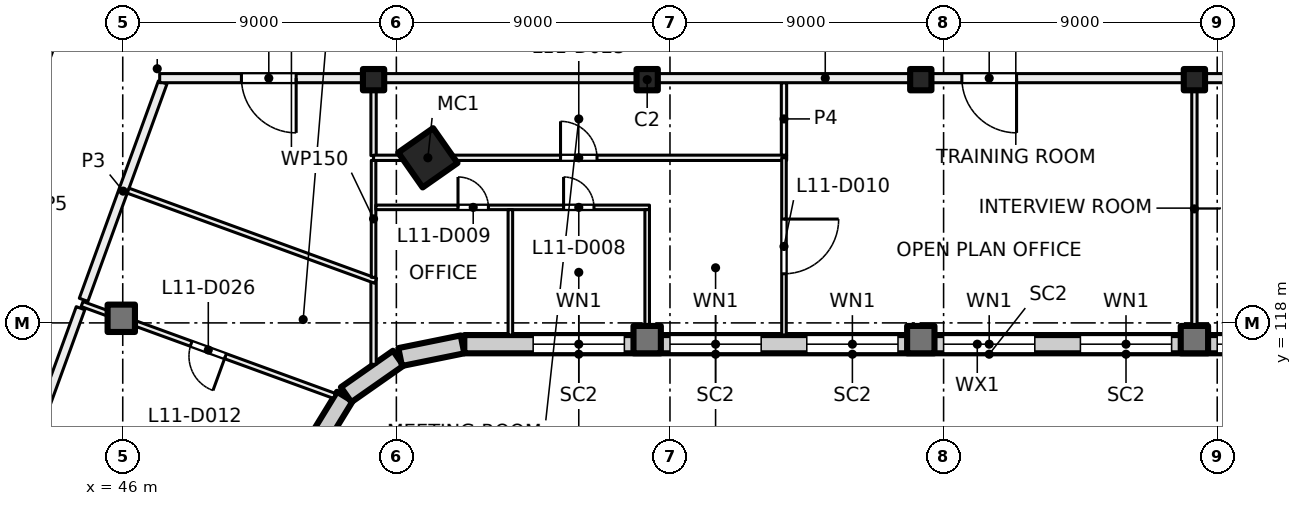
"""IFC4 building model, lengths in metres.
Left out: names, types, materials, properties, quantities, classifications, styles, units other than length and angle.
Written with IfcOpenShell. Run it as: python <this file> out.ifc"""

import sys

from ifc_helpers import new_model, si_unit, direction, frame, frame_2d, origin, origin_2d, place, context, subcontext, project, spatial, rectangle, hollow_rectangle, extrude, element, fill, save


model = new_model("IFC4")
c1 = context("Model", 3, precision=1e-05, world=origin(), true_north=direction((0.0, 1.0)))
c2 = subcontext(c1, "Body", "Model", "MODEL_VIEW")
j1 = project(units=[si_unit("LENGTHUNIT", "METRE"), si_unit("PLANEANGLEUNIT", "RADIAN")], contexts=[c1])
p1 = place(None, origin())
s1 = spatial("IfcSite", under=j1, at=p1, CompositionType="ELEMENT")
p2 = place(p1, origin())
s2 = spatial("IfcBuilding", under=s1, at=p2, CompositionType="ELEMENT")
p3 = place(p2, frame((0.0, 0.0, 51.5)))
s3 = spatial("IfcBuildingStorey", under=s2, at=p3, CompositionType="ELEMENT", Elevation=51.5)
p4 = place(p3, frame((56.036, 123.43, 0.0), z_axis=(0.0, 0.0, 1.0), x_axis=(0.573576436351, -0.819152044289, 0.0)))
e1 = element("IfcColumn", 1, at=p4, inside=s3, PredefinedType="COLUMN", context=c2, shape_type="SweptSolid", body=[
    extrude(hollow_rectangle(XDim=1.4, YDim=1.4, WallThickness=0.04, at=origin_2d()), origin(), (0.0, 0.0, 1.0), 4.0),
])
for number, where, z_axis, x_axis in (
    (2, (54.25, 126.0, 0.0), (0.0, 0.0, 1.0), (1.0, 0.0, 0.0)),
    (3, (63.25, 126.0, 0.0), (0.0, 0.0, 1.0), (1.0, 0.0, 0.0)),
    (4, (72.25, 126.0, 0.0), (0.0, 0.0, 1.0), (1.0, 0.0, 0.0)),
    (5, (81.25, 126.0, 0.0), (0.0, 0.0, 1.0), (1.0, 0.0, 0.0)),
):
    element("IfcColumn", number, at=place(p3, frame(where, z_axis=z_axis, x_axis=x_axis)), inside=s3, PredefinedType="COLUMN", context=c2, shape_type="SweptSolid", body=[
        extrude(rectangle(XDim=0.7, YDim=0.7, at=origin_2d()), origin(), (0.0, 0.0, 1.0), 4.0),
    ])
for number, where, z_axis, x_axis in (
    (6, (45.952, 118.152, 0.0), (0.0, 0.0, 1.0), (1.0, 0.0, 0.0)),
    (7, (63.25, 117.45, 0.0), (0.0, 0.0, 1.0), (1.0, 0.0, 0.0)),
    (8, (72.25, 117.45, 0.0), (0.0, 0.0, 1.0), (1.0, 0.0, 0.0)),
    (9, (81.25, 117.45, 0.0), (0.0, 0.0, 1.0), (1.0, 0.0, 0.0)),
):
    element("IfcColumn", number, at=place(p3, frame(where, z_axis=z_axis, x_axis=x_axis)), inside=s3, PredefinedType="COLUMN", context=c2, shape_type="SweptSolid", body=[
        extrude(rectangle(XDim=0.9, YDim=0.9, at=origin_2d()), origin(), (0.0, 0.0, 1.0), 4.0),
    ])
p5 = place(p3, frame((53.305, 115.578, 0.0), z_axis=(0.0, 0.0, 1.0), x_axis=(-0.522402266438, -0.852699168535, 0.0)))
e10 = element("IfcWall", 10, at=p5, inside=s3, PredefinedType="SOLIDWALL", context=c2, shape_type="SweptSolid", body=[
    extrude(rectangle(XDim=2.042, YDim=0.6, at=frame_2d((1.021, 0.0))), origin(), (0.0, 0.0, 1.0), 3.625),
])
for number, where, z_axis, x_axis in (
    (11, (55.062, 116.839, 0.0), (0.0, 0.0, 1.0), (-0.819, -0.574, 0.0)),
    (12, (57.175, 117.294, 0.0), (0.0, 0.0, 1.0), (-0.98, -0.199, 0.0)),
):
    element("IfcWall", number, at=place(p3, frame(where, z_axis=z_axis, x_axis=x_axis)), inside=s3, PredefinedType="SOLIDWALL", context=c2, shape_type="SweptSolid", body=[
        extrude(rectangle(XDim=2.092, YDim=0.6, at=frame_2d((1.046, 0.0))), origin(), (0.0, 0.0, 1.0), 3.625),
    ])
p6 = place(p3, frame((90.98, 117.3, 0.0), z_axis=(0.0, 0.0, 1.0), x_axis=(-1.0, 0.0, 0.0)))
e13 = element("IfcWall", 13, at=p6, inside=s3, PredefinedType="SOLIDWALL", context=c2, shape_type="SweptSolid", body=[
    extrude(rectangle(XDim=33.745, YDim=0.6, at=frame_2d((16.873, 0.0))), origin(), (0.0, 0.0, 1.0), 3.625),
])
p7 = place(p6, frame((1.48, 0.0, 0.9)))
e14 = element("IfcOpeningElement", 14, at=p7, cuts=e13, PredefinedType="OPENING", context=c2, shape_type="SweptSolid", body=[
    extrude(rectangle(XDim=3.0, YDim=2.4, at=frame_2d((1.5, 1.2))), frame((0.0, 0.31, 0.0), z_axis=(0.0, -1.0, 0.0), x_axis=(1.0, 0.0, 0.0)), (0.0, 0.0, 1.0), 0.62),
])
p8 = place(p6, frame((5.98, 0.0, 0.9)))
e15 = element("IfcOpeningElement", 15, at=p8, cuts=e13, PredefinedType="OPENING", context=c2, shape_type="SweptSolid", body=[
    extrude(rectangle(XDim=3.0, YDim=2.4, at=frame_2d((1.5, 1.2))), frame((0.0, 0.31, 0.0), z_axis=(0.0, -1.0, 0.0), x_axis=(1.0, 0.0, 0.0)), (0.0, 0.0, 1.0), 0.62),
])
p9 = place(p6, frame((10.48, 0.0, 0.9)))
e16 = element("IfcOpeningElement", 16, at=p9, cuts=e13, PredefinedType="OPENING", context=c2, shape_type="SweptSolid", body=[
    extrude(rectangle(XDim=3.0, YDim=2.4, at=frame_2d((1.5, 1.2))), frame((0.0, 0.31, 0.0), z_axis=(0.0, -1.0, 0.0), x_axis=(1.0, 0.0, 0.0)), (0.0, 0.0, 1.0), 0.62),
])
p10 = place(p6, frame((14.98, 0.0, 0.9)))
e17 = element("IfcOpeningElement", 17, at=p10, cuts=e13, PredefinedType="OPENING", context=c2, shape_type="SweptSolid", body=[
    extrude(rectangle(XDim=3.0, YDim=2.4, at=frame_2d((1.5, 1.2))), frame((0.0, 0.31, 0.0), z_axis=(0.0, -1.0, 0.0), x_axis=(1.0, 0.0, 0.0)), (0.0, 0.0, 1.0), 0.62),
])
p11 = place(p6, frame((19.48, 0.0, 0.9)))
e18 = element("IfcOpeningElement", 18, at=p11, cuts=e13, PredefinedType="OPENING", context=c2, shape_type="SweptSolid", body=[
    extrude(rectangle(XDim=3.0, YDim=2.4, at=frame_2d((1.5, 1.2))), frame((0.0, 0.31, 0.0), z_axis=(0.0, -1.0, 0.0), x_axis=(1.0, 0.0, 0.0)), (0.0, 0.0, 1.0), 0.62),
])
p12 = place(p6, frame((23.98, 0.0, 0.9)))
e19 = element("IfcOpeningElement", 19, at=p12, cuts=e13, PredefinedType="OPENING", context=c2, shape_type="SweptSolid", body=[
    extrude(rectangle(XDim=3.0, YDim=2.4, at=frame_2d((1.5, 1.2))), frame((0.0, 0.31, 0.0), z_axis=(0.0, -1.0, 0.0), x_axis=(1.0, 0.0, 0.0)), (0.0, 0.0, 1.0), 0.62),
])
p13 = place(p6, frame((28.48, 0.0, 0.9)))
e20 = element("IfcOpeningElement", 20, at=p13, cuts=e13, PredefinedType="OPENING", context=c2, shape_type="SweptSolid", body=[
    extrude(rectangle(XDim=3.0, YDim=2.4, at=frame_2d((1.5, 1.2))), frame((0.0, 0.31, 0.0), z_axis=(0.0, -1.0, 0.0), x_axis=(1.0, 0.0, 0.0)), (0.0, 0.0, 1.0), 0.62),
])
p14 = place(p3, frame((32.881, 97.657, 0.0), z_axis=(0.0, 0.0, 1.0), x_axis=(0.342017360004, 0.939693633828, 0.0)))
e21 = element("IfcWall", 21, at=p14, inside=s3, PredefinedType="PARTITIONING", context=c2, shape_type="SweptSolid", body=[
    extrude(rectangle(XDim=34.516, YDim=0.3, at=frame_2d((17.258, 0.0))), origin(), (0.0, 0.0, 1.0), 3.625),
])
p15 = place(p14, frame((4.275, 0.0, 0.0)))
e22 = element("IfcOpeningElement", 22, at=p15, cuts=e21, PredefinedType="OPENING", context=c2, shape_type="SweptSolid", body=[
    extrude(rectangle(XDim=1.2, YDim=2.1, at=frame_2d((0.6, 1.05))), frame((0.0, 0.16, 0.0), z_axis=(0.0, -1.0, 0.0), x_axis=(1.0, 0.0, 0.0)), (0.0, 0.0, 1.0), 0.32),
])
p16 = place(p14, frame((16.0, 0.0, 0.0)))
e23 = element("IfcOpeningElement", 23, at=p16, cuts=e21, PredefinedType="OPENING", context=c2, shape_type="SweptSolid", body=[
    extrude(rectangle(XDim=1.0, YDim=2.1, at=frame_2d((0.5, 1.05))), frame((0.0, 0.16, 0.0), z_axis=(0.0, -1.0, 0.0), x_axis=(1.0, 0.0, 0.0)), (0.0, 0.0, 1.0), 0.32),
])
p17 = place(p14, frame((21.5, 0.0, 0.0)))
e24 = element("IfcOpeningElement", 24, at=p17, cuts=e21, PredefinedType="OPENING", context=c2, shape_type="SweptSolid", body=[
    extrude(rectangle(XDim=1.0, YDim=2.1, at=frame_2d((0.5, 1.05))), frame((0.0, 0.16, 0.0), z_axis=(0.0, -1.0, 0.0), x_axis=(1.0, 0.0, 0.0)), (0.0, 0.0, 1.0), 0.32),
])
p18 = place(p3, frame((52.965, 115.598, 0.0), z_axis=(0.0, 0.0, 1.0), x_axis=(-0.939650555598, 0.342135694374, 0.0)))
e25 = element("IfcWall", 25, at=p18, inside=s3, PredefinedType="PARTITIONING", context=c2, shape_type="SweptSolid", body=[
    extrude(rectangle(XDim=8.836, YDim=0.175, at=frame_2d((4.418, 0.0))), origin(), (0.0, 0.0, 1.0), 3.625),
])
p19 = place(p18, frame((3.818, 0.0, 0.0)))
e26 = element("IfcOpeningElement", 26, at=p19, cuts=e25, PredefinedType="OPENING", context=c2, shape_type="SweptSolid", body=[
    extrude(rectangle(XDim=1.2, YDim=2.1, at=frame_2d((0.6, 1.05))), frame((0.0, 0.097, 0.0), z_axis=(0.0, -1.0, 0.0), x_axis=(1.0, 0.0, 0.0)), (0.0, 0.0, 1.0), 0.195),
])
p20 = place(p3, frame((44.612, 118.483, 0.0), z_axis=(0.0, 0.0, 1.0), x_axis=(-0.342043123066, -0.939684256526, 0.0)))
e27 = element("IfcWall", 27, at=p20, inside=s3, PredefinedType="PARTITIONING", context=c2, shape_type="SweptSolid", body=[
    extrude(rectangle(XDim=23.582, YDim=0.3, at=frame_2d((11.791, 0.0))), origin(), (0.0, 0.0, 1.0), 3.625),
])
p21 = place(p20, frame((14.932, 0.0, 0.0)))
e28 = element("IfcOpeningElement", 28, at=p21, cuts=e27, PredefinedType="OPENING", context=c2, shape_type="SweptSolid", body=[
    extrude(rectangle(XDim=0.8, YDim=2.1, at=frame_2d((0.4, 1.05))), frame((0.0, 0.16, 0.0), z_axis=(0.0, -1.0, 0.0), x_axis=(1.0, 0.0, 0.0)), (0.0, 0.0, 1.0), 0.32),
])
p22 = place(p20, frame((10.982, 0.0, 0.0)))
e29 = element("IfcOpeningElement", 29, at=p22, cuts=e27, PredefinedType="OPENING", context=c2, shape_type="SweptSolid", body=[
    extrude(rectangle(XDim=1.2, YDim=2.1, at=frame_2d((0.6, 1.05))), frame((0.0, 0.16, 0.0), z_axis=(0.0, -1.0, 0.0), x_axis=(1.0, 0.0, 0.0)), (0.0, 0.0, 1.0), 0.32),
])
p23 = place(p20, frame((19.307, 0.0, 0.0)))
e30 = element("IfcOpeningElement", 30, at=p23, cuts=e27, PredefinedType="OPENING", context=c2, shape_type="SweptSolid", body=[
    extrude(rectangle(XDim=1.8, YDim=2.1, at=frame_2d((0.9, 1.05))), frame((0.0, 0.16, 0.0), z_axis=(0.0, -1.0, 0.0), x_axis=(1.0, 0.0, 0.0)), (0.0, 0.0, 1.0), 0.32),
])
p24 = place(p20, frame((5.756, 0.0, 0.0)))
e31 = element("IfcOpeningElement", 31, at=p24, cuts=e27, PredefinedType="OPENING", context=c2, shape_type="SweptSolid", body=[
    extrude(rectangle(XDim=1.8, YDim=2.1, at=frame_2d((0.9, 1.05))), frame((0.0, 0.16, 0.0), z_axis=(0.0, -1.0, 0.0), x_axis=(1.0, 0.0, 0.0)), (0.0, 0.0, 1.0), 0.32),
])
p25 = place(p3, frame((47.314, 125.909, 0.0), z_axis=(0.0, 0.0, 1.0), x_axis=(-0.34198522802, -0.939705328183, 0.0)))
e32 = element("IfcWall", 32, at=p25, inside=s3, PredefinedType="PARTITIONING", context=c2, shape_type="SweptSolid", body=[
    extrude(rectangle(XDim=7.609, YDim=0.3, at=frame_2d((3.804, 0.0))), origin(), (0.0, 0.0, 1.0), 3.625),
])
p26 = place(p3, frame((54.25, 116.637, 0.0), z_axis=(0.0, 0.0, 1.0), x_axis=(0.0, 1.0, 0.0)))
e33 = element("IfcWall", 33, at=p26, inside=s3, PredefinedType="PARTITIONING", context=c2, shape_type="SweptSolid", body=[
    extrude(rectangle(XDim=2.776, YDim=0.175, at=frame_2d((1.388, 0.0))), origin(), (0.0, 0.0, 1.0), 3.625),
])
p27 = place(p3, frame((54.32, 119.384, 0.0), z_axis=(0.0, 0.0, 1.0), x_axis=(-0.939632908118, 0.342184157994, 0.0)))
e34 = element("IfcWall", 34, at=p27, inside=s3, PredefinedType="PARTITIONING", context=c2, shape_type="SweptSolid", body=[
    extrude(rectangle(XDim=8.665, YDim=0.175, at=frame_2d((4.333, 0.0))), origin(), (0.0, 0.0, 1.0), 3.625),
])
p28 = place(p3, frame((54.25, 119.498, 0.0), z_axis=(0.0, 0.0, 1.0), x_axis=(0.0, 1.0, 0.0)))
e35 = element("IfcWall", 35, at=p28, inside=s3, PredefinedType="PARTITIONING", context=c2, shape_type="SweptSolid", body=[
    extrude(rectangle(XDim=3.848, YDim=0.15, at=frame_2d((1.924, 0.0))), origin(), (0.0, 0.0, 1.0), 3.625),
])
p29 = place(p3, frame((54.325, 121.8, 0.0), z_axis=(0.0, 0.0, 1.0), x_axis=(1.0, 0.0, 0.0)))
e36 = element("IfcWall", 36, at=p29, inside=s3, PredefinedType="PARTITIONING", context=c2, shape_type="SweptSolid", body=[
    extrude(rectangle(XDim=9.0, YDim=0.15, at=frame_2d((4.5, 0.0))), origin(), (0.0, 0.0, 1.0), 3.625),
])
p30 = place(p29, frame((6.175, 0.0, 0.0)))
e37 = element("IfcOpeningElement", 37, at=p30, cuts=e36, PredefinedType="OPENING", context=c2, shape_type="SweptSolid", body=[
    extrude(rectangle(XDim=1.0, YDim=2.1, at=frame_2d((0.5, 1.05))), frame((0.0, 0.085, 0.0), z_axis=(0.0, -1.0, 0.0), x_axis=(1.0, 0.0, 0.0)), (0.0, 0.0, 1.0), 0.17),
])
p31 = place(p29, frame((2.702, 0.0, 0.0)))
e38 = element("IfcOpeningElement", 38, at=p31, cuts=e36, PredefinedType="OPENING", context=c2, shape_type="SweptSolid", body=[
    extrude(rectangle(XDim=1.0, YDim=2.1, at=frame_2d((0.5, 1.05))), frame((0.0, 0.085, 0.0), z_axis=(0.0, -1.0, 0.0), x_axis=(1.0, 0.0, 0.0)), (0.0, 0.0, 1.0), 0.17),
])
p32 = place(p3, frame((54.25, 123.502, 0.0), z_axis=(0.0, 0.0, 1.0), x_axis=(0.0, 1.0, 0.0)))
e39 = element("IfcWall", 39, at=p32, inside=s3, PredefinedType="PARTITIONING", context=c2, shape_type="SweptSolid", body=[
    extrude(rectangle(XDim=2.398, YDim=0.175, at=frame_2d((1.199, 0.0))), origin(), (0.0, 0.0, 1.0), 3.625),
])
p33 = place(p3, frame((54.25, 123.43, 0.0), z_axis=(0.0, 0.0, 1.0), x_axis=(1.0, 0.0, 0.0)))
e40 = element("IfcWall", 40, at=p33, inside=s3, PredefinedType="PARTITIONING", context=c2, shape_type="SweptSolid", body=[
    extrude(rectangle(XDim=13.588, YDim=0.175, at=frame_2d((6.794, 0.0))), origin(), (0.0, 0.0, 1.0), 3.625),
])
p34 = place(p33, frame((6.15, 0.0, 0.0)))
e41 = element("IfcOpeningElement", 41, at=p34, cuts=e40, PredefinedType="OPENING", context=c2, shape_type="SweptSolid", body=[
    extrude(rectangle(XDim=1.2, YDim=2.1, at=frame_2d((0.6, 1.05))), frame((0.0, 0.097, 0.0), z_axis=(0.0, -1.0, 0.0), x_axis=(1.0, 0.0, 0.0)), (0.0, 0.0, 1.0), 0.195),
])
for number, where, z_axis, x_axis in (
    (42, (58.75, 117.6, 0.0), (0.0, 0.0, 1.0), (0.0, 1.0, 0.0)),
    (43, (63.25, 117.6, 0.0), (0.0, 0.0, 1.0), (0.0, 1.0, 0.0)),
):
    element("IfcWall", number, at=place(p3, frame(where, z_axis=z_axis, x_axis=x_axis)), inside=s3, PredefinedType="PARTITIONING", context=c2, shape_type="SweptSolid", body=[
        extrude(rectangle(XDim=4.125, YDim=0.15, at=frame_2d((2.062, 0.0))), origin(), (0.0, 0.0, 1.0), 3.625),
    ])
p35 = place(p3, frame((67.75, 123.433, 0.0), z_axis=(0.0, 0.0, 1.0), x_axis=(0.0, -1.0, 0.0)))
e44 = element("IfcWall", 44, at=p35, inside=s3, PredefinedType="PARTITIONING", context=c2, shape_type="SweptSolid", body=[
    extrude(rectangle(XDim=5.833, YDim=0.15, at=frame_2d((2.917, 0.0))), origin(), (0.0, 0.0, 1.0), 3.625),
])
p36 = place(p35, frame((2.018, 0.0, 0.0)))
e45 = element("IfcOpeningElement", 45, at=p36, cuts=e44, PredefinedType="OPENING", context=c2, shape_type="SweptSolid", body=[
    extrude(rectangle(XDim=1.8, YDim=2.1, at=frame_2d((0.9, 1.05))), frame((0.0, 0.085, 0.0), z_axis=(0.0, -1.0, 0.0), x_axis=(1.0, 0.0, 0.0)), (0.0, 0.0, 1.0), 0.17),
])
p37 = place(p3, frame((67.75, 123.518, 0.0), z_axis=(0.0, 0.0, 1.0), x_axis=(0.0, 1.0, 0.0)))
e46 = element("IfcWall", 46, at=p37, inside=s3, PredefinedType="PARTITIONING", context=c2, shape_type="SweptSolid", body=[
    extrude(rectangle(XDim=2.382, YDim=0.175, at=frame_2d((1.191, 0.0))), origin(), (0.0, 0.0, 1.0), 3.625),
])
p38 = place(p3, frame((81.25, 117.6, 0.0), z_axis=(0.0, 0.0, 1.0), x_axis=(0.0, 1.0, 0.0)))
e47 = element("IfcWall", 47, at=p38, inside=s3, PredefinedType="PARTITIONING", context=c2, shape_type="SweptSolid", body=[
    extrude(rectangle(XDim=8.3, YDim=0.175, at=frame_2d((4.15, 0.0))), origin(), (0.0, 0.0, 1.0), 3.625),
])
p39 = place(p3, frame((91.0, 126.05, 0.0), z_axis=(0.0, 0.0, 1.0), x_axis=(-1.0, 0.0, 0.0)))
e48 = element("IfcWall", 48, at=p39, inside=s3, PredefinedType="PARTITIONING", context=c2, shape_type="SweptSolid", body=[
    extrude(rectangle(XDim=43.785, YDim=0.3, at=frame_2d((21.893, 0.0))), origin(), (0.0, 0.0, 1.0), 3.625),
])
p40 = place(p39, frame((2.025, 0.0, 0.0)))
e49 = element("IfcOpeningElement", 49, at=p40, cuts=e48, PredefinedType="OPENING", context=c2, shape_type="SweptSolid", body=[
    extrude(rectangle(XDim=1.2, YDim=2.1, at=frame_2d((0.6, 1.05))), frame((0.0, 0.16, 0.0), z_axis=(0.0, -1.0, 0.0), x_axis=(1.0, 0.0, 0.0)), (0.0, 0.0, 1.0), 0.32),
])
p41 = place(p39, frame((6.9, 0.0, 0.0)))
e50 = element("IfcOpeningElement", 50, at=p41, cuts=e48, PredefinedType="OPENING", context=c2, shape_type="SweptSolid", body=[
    extrude(rectangle(XDim=1.2, YDim=2.1, at=frame_2d((0.6, 1.05))), frame((0.0, 0.16, 0.0), z_axis=(0.0, -1.0, 0.0), x_axis=(1.0, 0.0, 0.0)), (0.0, 0.0, 1.0), 0.32),
])
p42 = place(p39, frame((15.6, 0.0, 0.0)))
e51 = element("IfcOpeningElement", 51, at=p42, cuts=e48, PredefinedType="OPENING", context=c2, shape_type="SweptSolid", body=[
    extrude(rectangle(XDim=1.8, YDim=2.1, at=frame_2d((0.9, 1.05))), frame((0.0, 0.16, 0.0), z_axis=(0.0, -1.0, 0.0), x_axis=(1.0, 0.0, 0.0)), (0.0, 0.0, 1.0), 0.32),
])
p43 = place(p39, frame((39.296, 0.0, 0.0)))
e52 = element("IfcOpeningElement", 52, at=p43, cuts=e48, PredefinedType="OPENING", context=c2, shape_type="SweptSolid", body=[
    extrude(rectangle(XDim=1.8, YDim=2.1, at=frame_2d((0.9, 1.05))), frame((0.0, 0.16, 0.0), z_axis=(0.0, -1.0, 0.0), x_axis=(1.0, 0.0, 0.0)), (0.0, 0.0, 1.0), 0.32),
])
p44 = place(p8, origin())
e53 = element("IfcWindow", 53, at=p44, inside=s3, PartitioningType="SINGLE_PANEL", PredefinedType="WINDOW", context=c2, shape_type="SweptSolid", body=[
    extrude(rectangle(XDim=3.0, YDim=2.4, at=frame_2d((1.5, 1.2))), frame((0.0, 0.03, 0.0), z_axis=(0.0, -1.0, 0.0), x_axis=(1.0, 0.0, 0.0)), (0.0, 0.0, 1.0), 0.06),
])
fill(e15, e53)
p45 = place(p9, origin())
e54 = element("IfcWindow", 54, at=p45, inside=s3, PartitioningType="SINGLE_PANEL", PredefinedType="WINDOW", context=c2, shape_type="SweptSolid", body=[
    extrude(rectangle(XDim=3.0, YDim=2.4, at=frame_2d((1.5, 1.2))), frame((0.0, 0.03, 0.0), z_axis=(0.0, -1.0, 0.0), x_axis=(1.0, 0.0, 0.0)), (0.0, 0.0, 1.0), 0.06),
])
fill(e16, e54)
p46 = place(p10, origin())
e55 = element("IfcWindow", 55, at=p46, inside=s3, PartitioningType="SINGLE_PANEL", PredefinedType="WINDOW", context=c2, shape_type="SweptSolid", body=[
    extrude(rectangle(XDim=3.0, YDim=2.4, at=frame_2d((1.5, 1.2))), frame((0.0, 0.03, 0.0), z_axis=(0.0, -1.0, 0.0), x_axis=(1.0, 0.0, 0.0)), (0.0, 0.0, 1.0), 0.06),
])
fill(e17, e55)
p47 = place(p11, origin())
e56 = element("IfcWindow", 56, at=p47, inside=s3, PartitioningType="SINGLE_PANEL", PredefinedType="WINDOW", context=c2, shape_type="SweptSolid", body=[
    extrude(rectangle(XDim=3.0, YDim=2.4, at=frame_2d((1.5, 1.2))), frame((0.0, 0.03, 0.0), z_axis=(0.0, -1.0, 0.0), x_axis=(1.0, 0.0, 0.0)), (0.0, 0.0, 1.0), 0.06),
])
fill(e18, e56)
p48 = place(p12, origin())
e57 = element("IfcWindow", 57, at=p48, inside=s3, PartitioningType="SINGLE_PANEL", PredefinedType="WINDOW", context=c2, shape_type="SweptSolid", body=[
    extrude(rectangle(XDim=3.0, YDim=2.4, at=frame_2d((1.5, 1.2))), frame((0.0, 0.03, 0.0), z_axis=(0.0, -1.0, 0.0), x_axis=(1.0, 0.0, 0.0)), (0.0, 0.0, 1.0), 0.06),
])
fill(e19, e57)
p49 = place(p13, origin())
e58 = element("IfcWindow", 58, at=p49, inside=s3, PartitioningType="SINGLE_PANEL", PredefinedType="WINDOW", context=c2, shape_type="SweptSolid", body=[
    extrude(rectangle(XDim=3.0, YDim=2.4, at=frame_2d((1.5, 1.2))), frame((0.0, 0.03, 0.0), z_axis=(0.0, -1.0, 0.0), x_axis=(1.0, 0.0, 0.0)), (0.0, 0.0, 1.0), 0.06),
])
fill(e20, e58)
p50 = place(p42, origin())
e59 = element("IfcDoor", 59, at=p50, inside=s3, OperationType="DOUBLE_DOOR_SINGLE_SWING", PredefinedType="DOOR", context=c2, shape_type="SweptSolid", body=[
    extrude(rectangle(XDim=1.8, YDim=2.1, at=frame_2d((0.9, 1.05))), frame((0.0, 0.025, 0.0), z_axis=(0.0, -1.0, 0.0), x_axis=(1.0, 0.0, 0.0)), (0.0, 0.0, 1.0), 0.05),
])
fill(e51, e59)
p51 = place(p30, origin())
e60 = element("IfcDoor", 60, at=p51, inside=s3, OperationType="SINGLE_SWING_RIGHT", PredefinedType="DOOR", context=c2, shape_type="SweptSolid", body=[
    extrude(rectangle(XDim=1.0, YDim=2.1, at=frame_2d((0.5, 1.05))), frame((0.0, 0.025, 0.0), z_axis=(0.0, -1.0, 0.0), x_axis=(1.0, 0.0, 0.0)), (0.0, 0.0, 1.0), 0.05),
])
fill(e37, e60)
p52 = place(p31, origin())
e61 = element("IfcDoor", 61, at=p52, inside=s3, OperationType="SINGLE_SWING_RIGHT", PredefinedType="DOOR", context=c2, shape_type="SweptSolid", body=[
    extrude(rectangle(XDim=1.0, YDim=2.1, at=frame_2d((0.5, 1.05))), frame((0.0, 0.025, 0.0), z_axis=(0.0, -1.0, 0.0), x_axis=(1.0, 0.0, 0.0)), (0.0, 0.0, 1.0), 0.05),
])
fill(e38, e61)
p53 = place(p36, origin())
e62 = element("IfcDoor", 62, at=p53, inside=s3, OperationType="DOUBLE_DOOR_SINGLE_SWING", PredefinedType="DOOR", context=c2, shape_type="SweptSolid", body=[
    extrude(rectangle(XDim=1.8, YDim=2.1, at=frame_2d((0.9, 1.05))), frame((0.0, 0.025, 0.0), z_axis=(0.0, -1.0, 0.0), x_axis=(1.0, 0.0, 0.0)), (0.0, 0.0, 1.0), 0.05),
])
fill(e45, e62)
p54 = place(p43, origin())
e63 = element("IfcDoor", 63, at=p54, inside=s3, OperationType="DOUBLE_DOOR_SINGLE_SWING", PredefinedType="DOOR", context=c2, shape_type="SweptSolid", body=[
    extrude(rectangle(XDim=1.8, YDim=2.1, at=frame_2d((0.9, 1.05))), frame((0.0, 0.025, 0.0), z_axis=(0.0, -1.0, 0.0), x_axis=(1.0, 0.0, 0.0)), (0.0, 0.0, 1.0), 0.05),
])
fill(e52, e63)
p55 = place(p34, origin())
e64 = element("IfcDoor", 64, at=p55, inside=s3, OperationType="DOUBLE_DOOR_SINGLE_SWING", PredefinedType="DOOR", context=c2, shape_type="SweptSolid", body=[
    extrude(rectangle(XDim=1.2, YDim=2.1, at=frame_2d((0.6, 1.05))), frame((0.0, 0.025, 0.0), z_axis=(0.0, -1.0, 0.0), x_axis=(1.0, 0.0, 0.0)), (0.0, 0.0, 1.0), 0.05),
])
fill(e41, e64)
p56 = place(p19, origin())
e65 = element("IfcDoor", 65, at=p56, inside=s3, OperationType="DOUBLE_DOOR_SINGLE_SWING", PredefinedType="DOOR", context=c2, shape_type="SweptSolid", body=[
    extrude(rectangle(XDim=1.2, YDim=2.1, at=frame_2d((0.6, 1.05))), frame((0.0, 0.025, 0.0), z_axis=(0.0, -1.0, 0.0), x_axis=(1.0, 0.0, 0.0)), (0.0, 0.0, 1.0), 0.05),
])
fill(e26, e65)
save(model, sys.argv[1])
